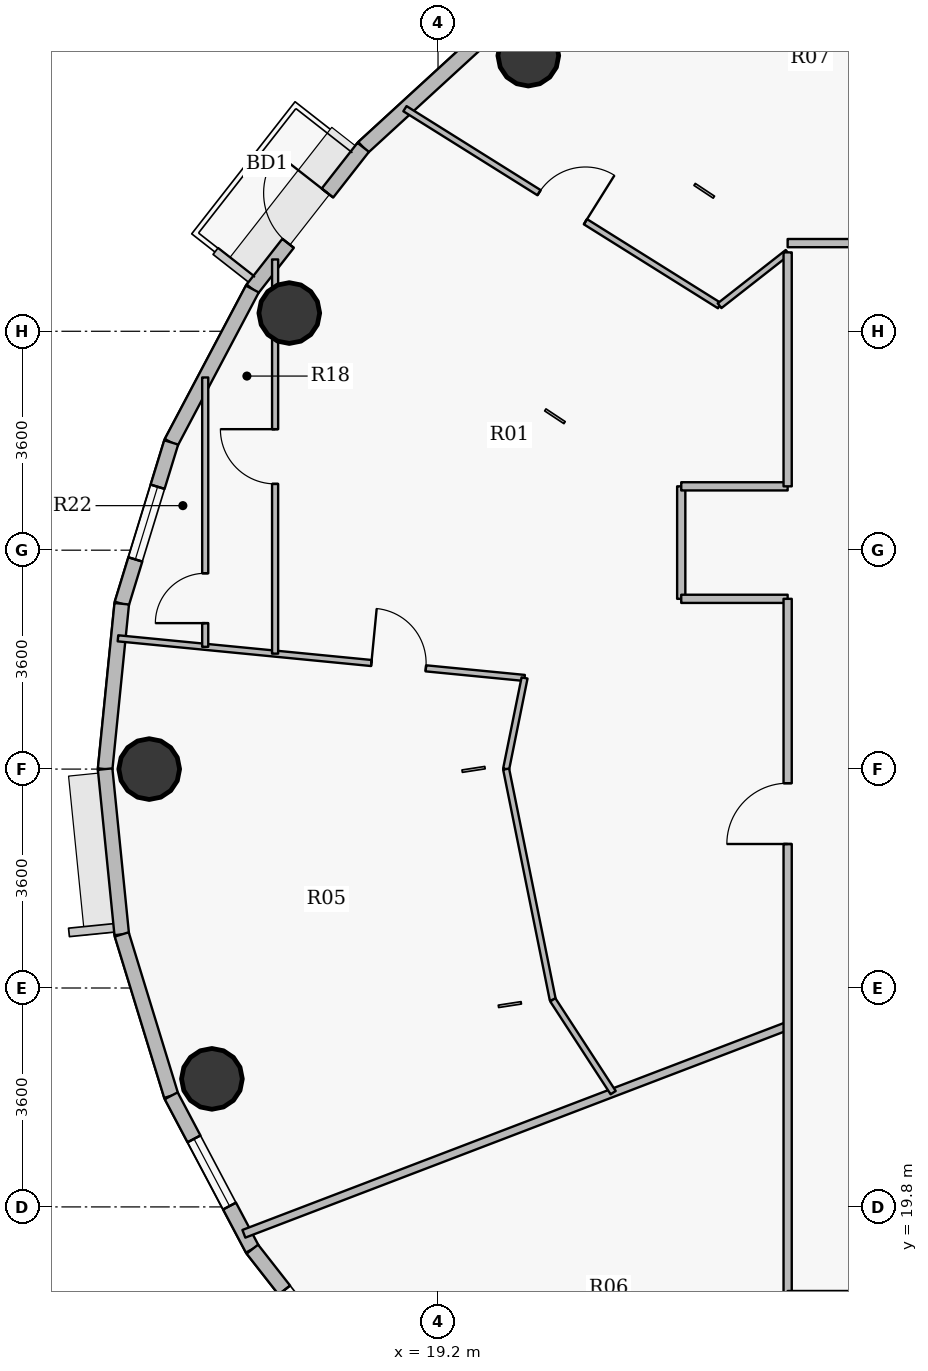
"""IFC4 building model, lengths in metres.
Left out: names, types, materials, properties, quantities, classifications, styles, units other than length and angle.
Written with IfcOpenShell. Run it as: python <this file> out.ifc"""

import sys

from ifc_helpers import new_model, si_unit, direction, frame, frame_2d, origin, origin_2d, place, context, subcontext, project, spatial, rectangle, hollow_circle, extrude, source, transform, mapped, element, fill, save


model = new_model("IFC4")
c1 = context("Model", 3, precision=1e-05, world=origin(), true_north=direction((0.0, 1.0)))
c2 = subcontext(c1, "Body", "Model", "MODEL_VIEW")
j1 = project(units=[si_unit("LENGTHUNIT", "METRE"), si_unit("PLANEANGLEUNIT", "RADIAN")], contexts=[c1])
p1 = place(None, origin())
s1 = spatial("IfcSite", under=j1, at=p1, CompositionType="ELEMENT")
p2 = place(p1, origin())
s2 = spatial("IfcBuilding", under=s1, at=p2, CompositionType="ELEMENT")
p3 = place(p2, frame((0.0, 0.0, 291.75)))
s3 = spatial("IfcBuildingStorey", under=s2, at=p3, CompositionType="ELEMENT", Elevation=291.75)
for number, where, z_axis, x_axis in (
    (1, (20.685, 38.733, 0.0), (0.0, 0.0, 1.0), (1.0, 0.0, 0.0)),
    (2, (16.754, 34.5, 0.0), (0.0, 0.0, 1.0), (1.0, 0.0, 0.0)),
    (3, (14.45, 27.0, 0.0), (0.0, 0.0, 1.0), (1.0, 0.0, 0.0)),
    (4, (15.481, 21.906, 0.0), (0.0, 0.0, 1.0), (1.0, 0.0, 0.0)),
):
    element("IfcColumn", number, at=place(p3, frame(where, z_axis=z_axis, x_axis=x_axis)), inside=s3, PredefinedType="COLUMN", context=c2, shape_type="SweptSolid", body=[
        extrude(hollow_circle(Radius=0.5, WallThickness=0.032, at=origin_2d()), origin(), (0.0, 0.0, 1.0), 3.75),
    ])
p4 = place(p3, frame((17.97, 37.225, 0.0), z_axis=(0.0, 0.0, 1.0), x_axis=(0.737068506972, 0.675818034703, 0.0)))
e5 = element("IfcWall", 5, at=p4, inside=s3, PredefinedType="SOLIDWALL", context=c2, shape_type="SweptSolid", body=[
    extrude(rectangle(XDim=3.077, YDim=0.24, at=frame_2d((1.539, 0.0))), origin(), (0.0, 0.0, 1.0), 3.5),
])
p5 = place(p3, frame((16.146, 34.895, 0.0), z_axis=(0.0, 0.0, 1.0), x_axis=(0.616337186556, 0.787482363275, 0.0)))
e6 = element("IfcWall", 6, at=p5, inside=s3, PredefinedType="SOLIDWALL", context=c2, shape_type="SweptSolid", body=[
    extrude(rectangle(XDim=2.958, YDim=0.24, at=frame_2d((1.479, 0.0))), origin(), (0.0, 0.0, 1.0), 3.5),
])
p6 = place(p5, frame((0.954, 0.0, 0.0)))
e7 = element("IfcOpeningElement", 7, at=p6, cuts=e6, PredefinedType="OPENING", context=c2, shape_type="SweptSolid", body=[
    extrude(rectangle(XDim=1.05, YDim=2.15, at=origin_2d()), frame((0.525, 0.13, 1.075), z_axis=(0.0, -1.0, 0.0), x_axis=(1.0, 0.0, 0.0)), (0.0, 0.0, 1.0), 0.26),
])
p7 = place(p3, frame((14.812, 32.372, 0.0), z_axis=(0.0, 0.0, 1.0), x_axis=(0.467628269026, 0.883925224218, 0.0)))
e8 = element("IfcWall", 8, at=p7, inside=s3, PredefinedType="SOLIDWALL", context=c2, shape_type="SweptSolid", body=[
    extrude(rectangle(XDim=2.854, YDim=0.24, at=frame_2d((1.427, 0.0))), origin(), (0.0, 0.0, 1.0), 3.5),
])
p8 = place(p3, frame((13.998, 29.719, 0.0), z_axis=(0.0, 0.0, 1.0), x_axis=(0.2931213403, 0.956075248012, 0.0)))
e9 = element("IfcWall", 9, at=p8, inside=s3, PredefinedType="SOLIDWALL", context=c2, shape_type="SweptSolid", body=[
    extrude(rectangle(XDim=2.775, YDim=0.24, at=frame_2d((1.388, 0.0))), origin(), (0.0, 0.0, 1.0), 3.5),
])
p9 = place(p8, frame((0.763, 0.0, 0.9)))
e10 = element("IfcOpeningElement", 10, at=p9, cuts=e9, PredefinedType="OPENING", context=c2, shape_type="SweptSolid", body=[
    extrude(rectangle(XDim=1.25, YDim=1.65, at=origin_2d()), frame((0.625, 0.13, 0.825), z_axis=(0.0, -1.0, 0.0), x_axis=(1.0, 0.0, 0.0)), (0.0, 0.0, 1.0), 0.26),
])
for number, where, z_axis, x_axis in (
    (11, (13.725, 27.0, 0.0), (0.0, 0.0, 1.0), (0.1, 0.995, 0.0)),
    (12, (13.998, 24.281, 0.0), (0.0, 0.0, 1.0), (-0.1, 0.995, 0.0)),
):
    element("IfcWall", number, at=place(p3, frame(where, z_axis=z_axis, x_axis=x_axis)), inside=s3, PredefinedType="SOLIDWALL", context=c2, shape_type="SweptSolid", body=[
        extrude(rectangle(XDim=2.733, YDim=0.24, at=frame_2d((1.366, 0.0))), origin(), (0.0, 0.0, 1.0), 3.5),
    ])
p10 = place(p3, frame((14.812, 21.628, 0.0), z_axis=(0.0, 0.0, 1.0), x_axis=(-0.2931213403, 0.956075248012, 0.0)))
e13 = element("IfcWall", 13, at=p10, inside=s3, PredefinedType="SOLIDWALL", context=c2, shape_type="SweptSolid", body=[
    extrude(rectangle(XDim=2.775, YDim=0.24, at=frame_2d((1.388, 0.0))), origin(), (0.0, 0.0, 1.0), 3.5),
])
p11 = place(p3, frame((16.146, 19.105, 0.0), z_axis=(0.0, 0.0, 1.0), x_axis=(-0.467628269026, 0.883925224218, 0.0)))
e14 = element("IfcWall", 14, at=p11, inside=s3, PredefinedType="SOLIDWALL", context=c2, shape_type="SweptSolid", body=[
    extrude(rectangle(XDim=2.854, YDim=0.24, at=frame_2d((1.427, 0.0))), origin(), (0.0, 0.0, 1.0), 3.5),
])
p12 = place(p11, frame((0.802, 0.0, 0.9)))
e15 = element("IfcOpeningElement", 15, at=p12, cuts=e14, PredefinedType="OPENING", context=c2, shape_type="SweptSolid", body=[
    extrude(rectangle(XDim=1.25, YDim=1.65, at=origin_2d()), frame((0.625, 0.13, 0.825), z_axis=(0.0, -1.0, 0.0), x_axis=(1.0, 0.0, 0.0)), (0.0, 0.0, 1.0), 0.26),
])
p13 = place(p3, frame((17.97, 16.775, 0.0), z_axis=(0.0, 0.0, 1.0), x_axis=(-0.616337186556, 0.787482363275, 0.0)))
e16 = element("IfcWall", 16, at=p13, inside=s3, PredefinedType="SOLIDWALL", context=c2, shape_type="SweptSolid", body=[
    extrude(rectangle(XDim=2.958, YDim=0.24, at=frame_2d((1.479, 0.0))), origin(), (0.0, 0.0, 1.0), 3.5),
])
p14 = place(p13, frame((0.854, 0.0, 0.9)))
e17 = element("IfcOpeningElement", 17, at=p14, cuts=e16, PredefinedType="OPENING", context=c2, shape_type="SweptSolid", body=[
    extrude(rectangle(XDim=1.25, YDim=1.65, at=origin_2d()), frame((0.625, 0.13, 0.825), z_axis=(0.0, -1.0, 0.0), x_axis=(1.0, 0.0, 0.0)), (0.0, 0.0, 1.0), 0.26),
])
p15 = place(p3, frame((13.936, 29.151, 0.0), z_axis=(0.0, 0.0, 1.0), x_axis=(0.995282339379, -0.097020950936, 0.0)))
e18 = element("IfcWall", 18, at=p15, inside=s3, PredefinedType="PARTITIONING", context=c2, shape_type="SweptSolid", body=[
    extrude(rectangle(XDim=6.719, YDim=0.1, at=frame_2d((3.359, 0.0))), origin(), (0.0, 0.0, 1.0), 2.985),
])
p16 = place(p15, frame((4.188, 0.0, 0.0)))
e19 = element("IfcOpeningElement", 19, at=p16, cuts=e18, PredefinedType="OPENING", context=c2, shape_type="SweptSolid", body=[
    extrude(rectangle(XDim=0.9, YDim=2.1, at=origin_2d()), frame((0.45, 0.06, 1.05), z_axis=(0.0, -1.0, 0.0), x_axis=(1.0, 0.0, 0.0)), (0.0, 0.0, 1.0), 0.12),
])
p17 = place(p3, frame((15.371, 29.011, 0.0), z_axis=(0.0, 0.0, 1.0), x_axis=(0.0, 1.0, 0.0)))
e20 = element("IfcWall", 20, at=p17, inside=s3, PredefinedType="PARTITIONING", context=c2, shape_type="SweptSolid", body=[
    extrude(rectangle(XDim=4.429, YDim=0.1, at=frame_2d((2.215, 0.0))), origin(), (0.0, 0.0, 1.0), 2.985),
])
p18 = place(p17, frame((0.389, 0.0, 0.0)))
e21 = element("IfcOpeningElement", 21, at=p18, cuts=e20, PredefinedType="OPENING", context=c2, shape_type="SweptSolid", body=[
    extrude(rectangle(XDim=0.82, YDim=2.1, at=origin_2d()), frame((0.41, 0.06, 1.05), z_axis=(0.0, -1.0, 0.0), x_axis=(1.0, 0.0, 0.0)), (0.0, 0.0, 1.0), 0.12),
])
p19 = place(p3, frame((16.007, 19.358, 0.0), z_axis=(0.0, 0.0, 1.0), x_axis=(0.934094110355, 0.35702687994, 0.0)))
e22 = element("IfcWall", 22, at=p19, inside=s3, PredefinedType="PARTITIONING", context=c2, shape_type="SweptSolid", body=[
    extrude(rectangle(XDim=9.574, YDim=0.135, at=frame_2d((4.787, 0.0))), origin(), (0.0, 0.0, 1.0), 2.985),
])
p20 = place(p3, frame((16.521, 28.899, 0.0), z_axis=(0.0, 0.0, 1.0), x_axis=(0.0, 1.0, 0.0)))
e23 = element("IfcWall", 23, at=p20, inside=s3, PredefinedType="PARTITIONING", context=c2, shape_type="SweptSolid", body=[
    extrude(rectangle(XDim=6.482, YDim=0.1, at=frame_2d((3.241, 0.0))), origin(), (0.0, 0.0, 1.0), 2.985),
])
p21 = place(p20, frame((2.791, 0.0, 0.0)))
e24 = element("IfcOpeningElement", 24, at=p21, cuts=e23, PredefinedType="OPENING", context=c2, shape_type="SweptSolid", body=[
    extrude(rectangle(XDim=0.9, YDim=2.1, at=origin_2d()), frame((0.45, 0.06, 1.05), z_axis=(0.0, -1.0, 0.0), x_axis=(1.0, 0.0, 0.0)), (0.0, 0.0, 1.0), 0.12),
])
p22 = place(p3, frame((18.656, 37.861, 0.0), z_axis=(0.0, 0.0, 1.0), x_axis=(0.847553170054, -0.530710489751, 0.0)))
e25 = element("IfcWall", 25, at=p22, inside=s3, PredefinedType="PARTITIONING", context=c2, shape_type="SweptSolid", body=[
    extrude(rectangle(XDim=6.105, YDim=0.1, at=frame_2d((3.052, 0.0))), origin(), (0.0, 0.0, 1.0), 2.985),
])
p23 = place(p22, frame((2.603, 0.0, 0.0)))
e26 = element("IfcOpeningElement", 26, at=p23, cuts=e25, PredefinedType="OPENING", context=c2, shape_type="SweptSolid", body=[
    extrude(rectangle(XDim=0.9, YDim=2.1, at=origin_2d()), frame((0.45, 0.06, 1.05), z_axis=(0.0, -1.0, 0.0), x_axis=(1.0, 0.0, 0.0)), (0.0, 0.0, 1.0), 0.12),
])
p24 = place(p3, frame((20.32, 27.0, 0.0), z_axis=(0.0, 0.0, 1.0), x_axis=(0.198264574188, 0.98014853906, 0.0)))
e27 = element("IfcWall", 27, at=p24, inside=s3, PredefinedType="PARTITIONING", context=c2, shape_type="SweptSolid", body=[
    extrude(rectangle(XDim=1.529, YDim=0.1, at=frame_2d((0.765, 0.0))), origin(), (0.0, 0.0, 1.0), 3.035),
])
p25 = place(p3, frame((20.32, 27.0, 0.0), z_axis=(0.0, 0.0, 1.0), x_axis=(0.198226068862, -0.980156327135, 0.0)))
e28 = element("IfcWall", 28, at=p25, inside=s3, PredefinedType="PARTITIONING", context=c2, shape_type="SweptSolid", body=[
    extrude(rectangle(XDim=3.871, YDim=0.1, at=frame_2d((1.936, 0.0))), origin(), (0.0, 0.0, 1.0), 3.035),
])
p26 = place(p3, frame((21.087, 23.206, 0.0), z_axis=(0.0, 0.0, 1.0), x_axis=(0.545384128846, -0.838186227519, 0.0)))
e29 = element("IfcWall", 29, at=p26, inside=s3, PredefinedType="PARTITIONING", context=c2, shape_type="SweptSolid", body=[
    extrude(rectangle(XDim=1.821, YDim=0.1, at=frame_2d((0.911, 0.0))), origin(), (0.0, 0.0, 1.0), 3.035),
])
p27 = place(p3, frame((23.2, 29.8, 0.0), z_axis=(0.0, 0.0, 1.0), x_axis=(0.0, 1.0, 0.0)))
e30 = element("IfcWall", 30, at=p27, inside=s3, PredefinedType="PARTITIONING", context=c2, shape_type="SweptSolid", body=[
    extrude(rectangle(XDim=1.85, YDim=0.135, at=frame_2d((0.925, 0.0))), origin(), (0.0, 0.0, 1.0), 3.185),
])
p28 = place(p3, frame((23.2, 29.8, 0.0), z_axis=(0.0, 0.0, 1.0), x_axis=(1.0, 0.0, 0.0)))
e31 = element("IfcWall", 31, at=p28, inside=s3, PredefinedType="PARTITIONING", context=c2, shape_type="SweptSolid", body=[
    extrude(rectangle(XDim=1.75, YDim=0.135, at=frame_2d((0.875, 0.0))), origin(), (0.0, 0.0, 1.0), 3.5),
])
p29 = place(p3, frame((23.2, 31.65, 0.0), z_axis=(0.0, 0.0, 1.0), x_axis=(1.0, 0.0, 0.0)))
e32 = element("IfcWall", 32, at=p29, inside=s3, PredefinedType="PARTITIONING", context=c2, shape_type="SweptSolid", body=[
    extrude(rectangle(XDim=1.75, YDim=0.135, at=frame_2d((0.875, 0.0))), origin(), (0.0, 0.0, 1.0), 3.035),
])
p30 = place(p3, frame((23.83, 34.621, 0.0), z_axis=(0.0, 0.0, 1.0), x_axis=(0.787407186809, 0.616433226037, 0.0)))
e33 = element("IfcWall", 33, at=p30, inside=s3, PredefinedType="PARTITIONING", context=c2, shape_type="SweptSolid", body=[
    extrude(rectangle(XDim=1.422, YDim=0.1, at=frame_2d((0.711, 0.0))), origin(), (0.0, 0.0, 1.0), 3.035),
])
p31 = place(p3, frame((24.95, 18.35, 0.0), z_axis=(0.0, 0.0, 1.0), x_axis=(0.0, 1.0, 0.0)))
e34 = element("IfcWall", 34, at=p31, inside=s3, PredefinedType="PARTITIONING", context=c2, shape_type="SweptSolid", body=[
    extrude(rectangle(XDim=11.45, YDim=0.135, at=frame_2d((5.725, 0.0))), origin(), (0.0, 0.0, 1.0), 3.035),
])
p32 = place(p31, frame((7.418, 0.0, 0.0)))
e35 = element("IfcOpeningElement", 35, at=p32, cuts=e34, PredefinedType="OPENING", context=c2, shape_type="SweptSolid", body=[
    extrude(rectangle(XDim=1.0, YDim=2.15, at=origin_2d()), frame((0.5, 0.078, 1.075), z_axis=(0.0, -1.0, 0.0), x_axis=(1.0, 0.0, 0.0)), (0.0, 0.0, 1.0), 0.155),
])
p33 = place(p3, frame((24.95, 18.35, 0.0), z_axis=(0.0, 0.0, 1.0), x_axis=(1.0, 0.0, 0.0)))
e36 = element("IfcWall", 36, at=p33, inside=s3, PredefinedType="PARTITIONING", context=c2, shape_type="SweptSolid", body=[
    extrude(rectangle(XDim=22.1, YDim=0.135, at=frame_2d((11.05, 0.0))), origin(), (0.0, 0.0, 1.0), 3.035),
])
p34 = place(p33, frame((6.49, 0.0, 0.0)))
e37 = element("IfcOpeningElement", 37, at=p34, cuts=e36, PredefinedType="OPENING", context=c2, shape_type="SweptSolid", body=[
    extrude(rectangle(XDim=1.0, YDim=2.15, at=origin_2d()), frame((0.5, 0.078, 1.075), z_axis=(0.0, -1.0, 0.0), x_axis=(1.0, 0.0, 0.0)), (0.0, 0.0, 1.0), 0.155),
])
p35 = place(p3, frame((24.95, 31.65, 0.0), z_axis=(0.0, 0.0, 1.0), x_axis=(0.0, 1.0, 0.0)))
e38 = element("IfcWall", 38, at=p35, inside=s3, PredefinedType="PARTITIONING", context=c2, shape_type="SweptSolid", body=[
    extrude(rectangle(XDim=3.847, YDim=0.135, at=frame_2d((1.924, 0.0))), origin(), (0.0, 0.0, 1.0), 3.035),
])
p36 = place(p3, frame((24.95, 35.65, 0.0), z_axis=(0.0, 0.0, 1.0), x_axis=(1.0, 0.0, 0.0)))
e39 = element("IfcWall", 39, at=p36, inside=s3, PredefinedType="PARTITIONING", context=c2, shape_type="SweptSolid", body=[
    extrude(rectangle(XDim=10.1, YDim=0.135, at=frame_2d((5.05, 0.0))), origin(), (0.0, 0.0, 1.0), 3.035),
])
m1 = source(origin(), c2, "Body", "SweptSolid", [
    extrude(rectangle(XDim=1.05, YDim=2.15, at=origin_2d()), frame((0.525, 0.025, 1.075), z_axis=(0.0, -1.0, 0.0), x_axis=(1.0, 0.0, 0.0)), (0.0, 0.0, 1.0), 0.05),
])
p37 = place(p6, origin())
e40 = element("IfcDoor", 40, at=p37, inside=s3, OperationType="SINGLE_SWING_RIGHT", PredefinedType="DOOR", context=c2, shape_type="MappedRepresentation", body=[
    mapped(m1, transform((0.0, 0.0, 0.0), x_axis=(1.0, 0.0, 0.0), y_axis=(0.0, 1.0, 0.0), z_axis=(0.0, 0.0, 1.0), scale=1.0)),
])
fill(e7, e40)
m2 = source(origin(), c2, "Body", "SweptSolid", [
    extrude(rectangle(XDim=1.25, YDim=1.65, at=origin_2d()), frame((0.625, 0.03, 0.825), z_axis=(0.0, -1.0, 0.0), x_axis=(1.0, 0.0, 0.0)), (0.0, 0.0, 1.0), 0.06),
])
p38 = place(p9, origin())
e41 = element("IfcWindow", 41, at=p38, inside=s3, PartitioningType="SINGLE_PANEL", PredefinedType="WINDOW", context=c2, shape_type="MappedRepresentation", body=[
    mapped(m2, transform((0.0, 0.0, 0.0), x_axis=(1.0, 0.0, 0.0), y_axis=(0.0, 1.0, 0.0), z_axis=(0.0, 0.0, 1.0), scale=1.0)),
])
fill(e10, e41)
p39 = place(p14, origin())
e42 = element("IfcWindow", 42, at=p39, inside=s3, PartitioningType="SINGLE_PANEL", PredefinedType="WINDOW", context=c2, shape_type="MappedRepresentation", body=[
    mapped(m2, transform((0.0, 0.0, 0.0), x_axis=(1.0, 0.0, 0.0), y_axis=(0.0, 1.0, 0.0), z_axis=(0.0, 0.0, 1.0), scale=1.0)),
])
fill(e17, e42)
p40 = place(p12, origin())
e43 = element("IfcWindow", 43, at=p40, inside=s3, PartitioningType="SINGLE_PANEL", PredefinedType="WINDOW", context=c2, shape_type="MappedRepresentation", body=[
    mapped(m2, transform((0.0, 0.0, 0.0), x_axis=(1.0, 0.0, 0.0), y_axis=(0.0, 1.0, 0.0), z_axis=(0.0, 0.0, 1.0), scale=1.0)),
])
fill(e15, e43)
m3 = source(origin(), c2, "Body", "SweptSolid", [
    extrude(rectangle(XDim=1.0, YDim=2.15, at=origin_2d()), frame((0.5, 0.025, 1.075), z_axis=(0.0, -1.0, 0.0), x_axis=(1.0, 0.0, 0.0)), (0.0, 0.0, 1.0), 0.05),
])
p41 = place(p32, origin())
e44 = element("IfcDoor", 44, at=p41, inside=s3, OperationType="SINGLE_SWING_LEFT", PredefinedType="DOOR", context=c2, shape_type="MappedRepresentation", body=[
    mapped(m3, transform((0.0, 0.0, 0.0), x_axis=(1.0, 0.0, 0.0), y_axis=(0.0, 1.0, 0.0), z_axis=(0.0, 0.0, 1.0), scale=1.0)),
])
fill(e35, e44)
m4 = source(origin(), c2, "Body", "SweptSolid", [
    extrude(rectangle(XDim=0.9, YDim=2.1, at=origin_2d()), frame((0.45, 0.025, 1.05), z_axis=(0.0, -1.0, 0.0), x_axis=(1.0, 0.0, 0.0)), (0.0, 0.0, 1.0), 0.05),
])
p42 = place(p23, origin())
e45 = element("IfcDoor", 45, at=p42, inside=s3, OperationType="SINGLE_SWING_RIGHT", PredefinedType="DOOR", context=c2, shape_type="MappedRepresentation", body=[
    mapped(m4, transform((0.0, 0.0, 0.0), x_axis=(1.0, 0.0, 0.0), y_axis=(0.0, 1.0, 0.0), z_axis=(0.0, 0.0, 1.0), scale=1.0)),
])
fill(e26, e45)
p43 = place(p16, origin())
e46 = element("IfcDoor", 46, at=p43, inside=s3, OperationType="SINGLE_SWING_LEFT", PredefinedType="DOOR", context=c2, shape_type="MappedRepresentation", body=[
    mapped(m4, transform((0.0, 0.0, 0.0), x_axis=(1.0, 0.0, 0.0), y_axis=(0.0, 1.0, 0.0), z_axis=(0.0, 0.0, 1.0), scale=1.0)),
])
fill(e19, e46)
p44 = place(p21, origin())
e47 = element("IfcDoor", 47, at=p44, inside=s3, OperationType="SINGLE_SWING_RIGHT", PredefinedType="DOOR", context=c2, shape_type="MappedRepresentation", body=[
    mapped(m4, transform((0.0, 0.0, 0.0), x_axis=(1.0, 0.0, 0.0), y_axis=(0.0, 1.0, 0.0), z_axis=(0.0, 0.0, 1.0), scale=1.0)),
])
fill(e24, e47)
m5 = source(origin(), c2, "Body", "SweptSolid", [
    extrude(rectangle(XDim=0.82, YDim=2.1, at=origin_2d()), frame((0.41, 0.025, 1.05), z_axis=(0.0, -1.0, 0.0), x_axis=(1.0, 0.0, 0.0)), (0.0, 0.0, 1.0), 0.05),
])
p45 = place(p18, origin())
e48 = element("IfcDoor", 48, at=p45, inside=s3, OperationType="SINGLE_SWING_LEFT", PredefinedType="DOOR", context=c2, shape_type="MappedRepresentation", body=[
    mapped(m5, transform((0.0, 0.0, 0.0), x_axis=(1.0, 0.0, 0.0), y_axis=(0.0, 1.0, 0.0), z_axis=(0.0, 0.0, 1.0), scale=1.0)),
])
fill(e21, e48)
save(model, sys.argv[1])
